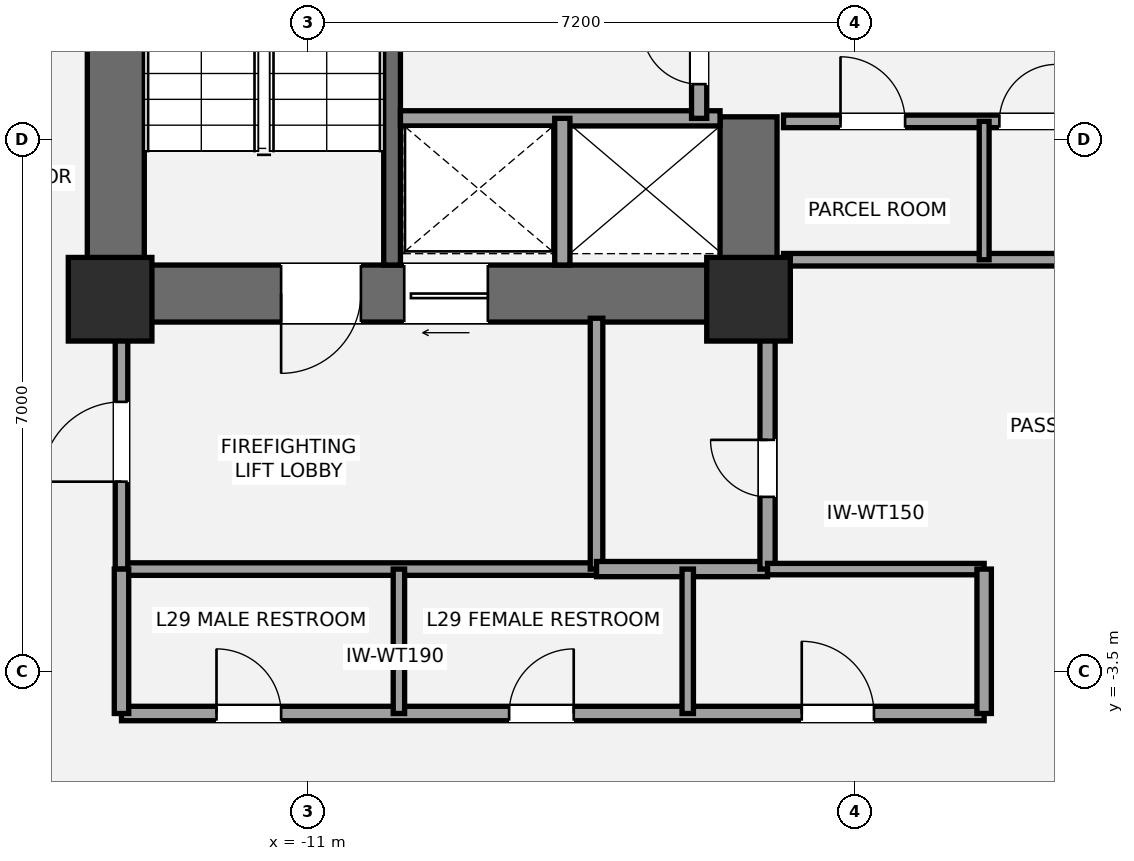
"""IFC4 building model, lengths in metres.
Left out: names, types, materials, properties, quantities, classifications, styles, units other than length and angle.
Written with IfcOpenShell. Run it as: python <this file> out.ifc"""

import sys

from ifc_helpers import new_model, si_unit, direction, frame, frame_2d, origin, origin_2d, place, context, subcontext, project, spatial, rectangle, extrude, element, fill, save


model = new_model("IFC4")
c1 = context("Model", 3, precision=1e-05, world=origin(), true_north=direction((0.0, 1.0)))
c2 = subcontext(c1, "Body", "Model", "MODEL_VIEW")
j1 = project(units=[si_unit("LENGTHUNIT", "METRE"), si_unit("PLANEANGLEUNIT", "RADIAN")], contexts=[c1])
p1 = place(None, origin())
s1 = spatial("IfcSite", under=j1, at=p1, CompositionType="ELEMENT")
p2 = place(p1, origin())
s2 = spatial("IfcBuilding", under=s1, at=p2, CompositionType="ELEMENT")
p3 = place(p2, frame((0.0, 0.0, 110.6)))
s3 = spatial("IfcBuildingStorey", under=s2, at=p3, CompositionType="ELEMENT", Elevation=110.6)
p4 = place(p3, frame((-13.525, 1.1, 0.0), z_axis=(0.0, 0.0, 1.0), x_axis=(0.0, 1.0, 0.0)))
e1 = element("IfcWall", 1, at=p4, inside=s3, PredefinedType="SHEAR", context=c2, shape_type="SweptSolid", body=[
    extrude(rectangle(XDim=8.65, YDim=0.75, at=frame_2d((4.325, 0.0))), origin(), (0.0, 0.0, 1.0), 3.5),
])
p5 = place(p3, frame((-4.825, 1.475, 0.0), z_axis=(0.0, 0.0, 1.0), x_axis=(-1.0, 0.0, 0.0)))
e2 = element("IfcWall", 2, at=p5, inside=s3, PredefinedType="SHEAR", context=c2, shape_type="SweptSolid", body=[
    extrude(rectangle(XDim=9.075, YDim=0.75, at=frame_2d((4.538, 0.0))), origin(), (0.0, 0.0, 1.0), 3.5),
])
p6 = place(p5, frame((5.475, 0.0, 0.0)))
e3 = element("IfcOpeningElement", 3, at=p6, cuts=e2, PredefinedType="OPENING", context=c2, shape_type="SweptSolid", body=[
    extrude(rectangle(XDim=1.05, YDim=2.15, at=frame_2d((0.525, 1.075))), frame((0.0, 0.385, 0.0), z_axis=(0.0, -1.0, 0.0), x_axis=(1.0, 0.0, 0.0)), (0.0, 0.0, 1.0), 0.77),
])
p7 = place(p5, frame((3.805, 0.0, 0.0)))
e4 = element("IfcOpeningElement", 4, at=p7, cuts=e2, PredefinedType="OPENING", context=c2, shape_type="SweptSolid", body=[
    extrude(rectangle(XDim=1.1, YDim=2.2, at=frame_2d((0.55, 1.1))), frame((0.0, 0.385, 0.0), z_axis=(0.0, -1.0, 0.0), x_axis=(1.0, 0.0, 0.0)), (0.0, 0.0, 1.0), 0.77),
])
p8 = place(p3, frame((-5.2, 1.1, 0.0), z_axis=(0.0, 0.0, 1.0), x_axis=(0.0, 1.0, 0.0)))
e5 = element("IfcWall", 5, at=p8, inside=s3, PredefinedType="SHEAR", context=c2, shape_type="SweptSolid", body=[
    extrude(rectangle(XDim=2.7, YDim=0.75, at=frame_2d((1.35, 0.0))), origin(), (0.0, 0.0, 1.0), 3.5),
])
p9 = place(p3, frame((-9.89, 1.85, 0.0), z_axis=(0.0, 0.0, 1.0), x_axis=(0.0, 1.0, 0.0)))
e6 = element("IfcWall", 6, at=p9, inside=s3, PredefinedType="SHEAR", context=c2, shape_type="SweptSolid", body=[
    extrude(rectangle(XDim=7.15, YDim=0.22, at=frame_2d((3.575, 0.0))), origin(), (0.0, 0.0, 1.0), 3.5),
])
for number, where, z_axis, x_axis in (
    (7, (-13.6, 1.4, 0.0), (0.0, 0.0, 1.0), (1.0, 0.0, 0.0)),
    (8, (-5.2, 1.4, 0.0), (0.0, 0.0, 1.0), (1.0, 0.0, 0.0)),
):
    element("IfcColumn", number, at=place(p3, frame(where, z_axis=z_axis, x_axis=x_axis)), inside=s3, PredefinedType="COLUMN", context=c2, shape_type="SweptSolid", body=[
        extrude(rectangle(XDim=1.1, YDim=1.1, at=origin_2d()), origin(), (0.0, 0.0, 1.0), 3.5),
    ])
p10 = place(p3, frame((-13.45, -2.15, 0.0), z_axis=(0.0, 0.0, 1.0), x_axis=(1.0, 0.0, 0.0)))
e9 = element("IfcWall", 9, at=p10, inside=s3, PredefinedType="PARTITIONING", context=c2, shape_type="SweptSolid", body=[
    extrude(rectangle(XDim=6.25, YDim=0.165, at=frame_2d((3.125, 0.0))), origin(), (0.0, 0.0, 1.0), 3.31),
])
p11 = place(p3, frame((-13.45, -2.15, 0.0), z_axis=(0.0, 0.0, 1.0), x_axis=(0.0, 1.0, 0.0)))
e10 = element("IfcWall", 10, at=p11, inside=s3, PredefinedType="PARTITIONING", context=c2, shape_type="SweptSolid", body=[
    extrude(rectangle(XDim=3.3, YDim=0.165, at=frame_2d((1.65, 0.0))), origin(), (0.0, 0.0, 1.0), 2.763),
])
p12 = place(p11, frame((1.15, 0.0, 0.0)))
e11 = element("IfcOpeningElement", 11, at=p12, cuts=e10, PredefinedType="OPENING", context=c2, shape_type="SweptSolid", body=[
    extrude(rectangle(XDim=1.05, YDim=2.15, at=frame_2d((0.525, 1.075))), frame((0.0, 0.093, 0.0), z_axis=(0.0, -1.0, 0.0), x_axis=(1.0, 0.0, 0.0)), (0.0, 0.0, 1.0), 0.185),
])
p13 = place(p3, frame((-7.2, -2.15, 0.0), z_axis=(0.0, 0.0, 1.0), x_axis=(0.0, 1.0, 0.0)))
e12 = element("IfcWall", 12, at=p13, inside=s3, PredefinedType="PARTITIONING", context=c2, shape_type="SweptSolid", body=[
    extrude(rectangle(XDim=3.3, YDim=0.165, at=frame_2d((1.65, 0.0))), origin(), (0.0, 0.0, 1.0), 2.763),
])
p14 = place(p3, frame((-7.2, -2.15, 0.0), z_axis=(0.0, 0.0, 1.0), x_axis=(1.0, 0.0, 0.0)))
e13 = element("IfcWall", 13, at=p14, inside=s3, PredefinedType="SOLIDWALL", context=c2, shape_type="SweptSolid", body=[
    extrude(rectangle(XDim=2.25, YDim=0.2, at=frame_2d((1.125, 0.0))), origin(), (0.0, 0.0, 1.0), 2.763),
])
p15 = place(p3, frame((-4.95, -2.15, 0.0), z_axis=(0.0, 0.0, 1.0), x_axis=(0.0, 1.0, 0.0)))
e14 = element("IfcWall", 14, at=p15, inside=s3, PredefinedType="SOLIDWALL", context=c2, shape_type="SweptSolid", body=[
    extrude(rectangle(XDim=3.3, YDim=0.2, at=frame_2d((1.65, 0.0))), origin(), (0.0, 0.0, 1.0), 2.763),
])
p16 = place(p15, frame((0.95, 0.0, 0.0)))
e15 = element("IfcOpeningElement", 15, at=p16, cuts=e14, PredefinedType="OPENING", context=c2, shape_type="SweptSolid", body=[
    extrude(rectangle(XDim=0.75, YDim=2.1, at=frame_2d((0.375, 1.05))), frame((0.0, 0.11, 0.0), z_axis=(0.0, -1.0, 0.0), x_axis=(1.0, 0.0, 0.0)), (0.0, 0.0, 1.0), 0.22),
])
p17 = place(p3, frame((-9.78, 3.78, 0.0), z_axis=(0.0, 0.0, 1.0), x_axis=(1.0, 0.0, 0.0)))
e16 = element("IfcWall", 16, at=p17, inside=s3, PredefinedType="SOLIDWALL", context=c2, shape_type="SweptSolid", body=[
    extrude(rectangle(XDim=4.205, YDim=0.2, at=frame_2d((2.103, 0.0))), origin(), (0.0, 0.0, 1.0), 3.31),
])
p18 = place(p3, frame((-7.65, 1.85, 0.0), z_axis=(0.0, 0.0, 1.0), x_axis=(0.0, 1.0, 0.0)))
e17 = element("IfcWall", 17, at=p18, inside=s3, PredefinedType="SOLIDWALL", context=c2, shape_type="SweptSolid", body=[
    extrude(rectangle(XDim=1.93, YDim=0.2, at=frame_2d((0.965, 0.0))), origin(), (0.0, 0.0, 1.0), 3.31),
])
p19 = place(p3, frame((-5.85, 3.78, 0.0), z_axis=(0.0, 0.0, 1.0), x_axis=(0.0, 1.0, 0.0)))
e18 = element("IfcWall", 18, at=p19, inside=s3, PredefinedType="SOLIDWALL", context=c2, shape_type="SweptSolid", body=[
    extrude(rectangle(XDim=1.69, YDim=0.2, at=frame_2d((0.845, 0.0))), origin(), (0.0, 0.0, 1.0), 3.31),
])
p20 = place(p19, frame((0.45, 0.0, 0.0)))
e19 = element("IfcOpeningElement", 19, at=p20, cuts=e18, PredefinedType="OPENING", context=c2, shape_type="SweptSolid", body=[
    extrude(rectangle(XDim=0.75, YDim=2.1, at=frame_2d((0.375, 1.05))), frame((0.0, 0.11, 0.0), z_axis=(0.0, -1.0, 0.0), x_axis=(1.0, 0.0, 0.0)), (0.0, 0.0, 1.0), 0.22),
])
p21 = place(p3, frame((-4.74, 1.92, 0.0), z_axis=(0.0, 0.0, 1.0), x_axis=(1.0, 0.0, 0.0)))
e20 = element("IfcWall", 20, at=p21, inside=s3, PredefinedType="PARTITIONING", context=c2, shape_type="SweptSolid", body=[
    extrude(rectangle(XDim=3.89, YDim=0.165, at=frame_2d((1.945, 0.0))), origin(), (0.0, 0.0, 1.0), 2.3),
])
p22 = place(p3, frame((-4.74, 3.74, 0.0), z_axis=(0.0, 0.0, 1.0), x_axis=(1.0, 0.0, 0.0)))
e21 = element("IfcWall", 21, at=p22, inside=s3, PredefinedType="PARTITIONING", context=c2, shape_type="SweptSolid", body=[
    extrude(rectangle(XDim=3.89, YDim=0.165, at=frame_2d((1.945, 0.0))), origin(), (0.0, 0.0, 1.0), 3.31),
])
p23 = place(p22, frame((0.75, 0.0, 0.0)))
e22 = element("IfcOpeningElement", 22, at=p23, cuts=e21, PredefinedType="OPENING", context=c2, shape_type="SweptSolid", body=[
    extrude(rectangle(XDim=0.85, YDim=2.1, at=frame_2d((0.425, 1.05))), frame((0.0, 0.093, 0.0), z_axis=(0.0, -1.0, 0.0), x_axis=(1.0, 0.0, 0.0)), (0.0, 0.0, 1.0), 0.185),
])
p24 = place(p22, frame((2.84, 0.0, 0.0)))
e23 = element("IfcOpeningElement", 23, at=p24, cuts=e21, PredefinedType="OPENING", context=c2, shape_type="SweptSolid", body=[
    extrude(rectangle(XDim=0.75, YDim=2.1, at=frame_2d((0.375, 1.05))), frame((0.0, 0.093, 0.0), z_axis=(0.0, -1.0, 0.0), x_axis=(1.0, 0.0, 0.0)), (0.0, 0.0, 1.0), 0.185),
])
p25 = place(p3, frame((-2.1, 1.92, 0.0), z_axis=(0.0, 0.0, 1.0), x_axis=(0.0, 1.0, 0.0)))
e24 = element("IfcWall", 24, at=p25, inside=s3, PredefinedType="PARTITIONING", context=c2, shape_type="SweptSolid", body=[
    extrude(rectangle(XDim=1.82, YDim=0.13, at=frame_2d((0.91, 0.0))), origin(), (0.0, 0.0, 1.0), 3.31),
])
p26 = place(p3, frame((-13.45, -4.05, 0.0), z_axis=(0.0, 0.0, 1.0), x_axis=(1.0, 0.0, 0.0)))
e25 = element("IfcWall", 25, at=p26, inside=s3, PredefinedType="PLUMBINGWALL", context=c2, shape_type="SweptSolid", body=[
    extrude(rectangle(XDim=11.35, YDim=0.19, at=frame_2d((5.675, 0.0))), origin(), (0.0, 0.0, 1.0), 2.763),
])
p27 = place(p26, frame((1.25, 0.0, 0.0)))
e26 = element("IfcOpeningElement", 26, at=p27, cuts=e25, PredefinedType="OPENING", context=c2, shape_type="SweptSolid", body=[
    extrude(rectangle(XDim=0.85, YDim=2.1, at=frame_2d((0.425, 1.05))), frame((0.0, 0.105, 0.0), z_axis=(0.0, -1.0, 0.0), x_axis=(1.0, 0.0, 0.0)), (0.0, 0.0, 1.0), 0.21),
])
p28 = place(p26, frame((5.1, 0.0, 0.0)))
e27 = element("IfcOpeningElement", 27, at=p28, cuts=e25, PredefinedType="OPENING", context=c2, shape_type="SweptSolid", body=[
    extrude(rectangle(XDim=0.85, YDim=2.1, at=frame_2d((0.425, 1.05))), frame((0.0, 0.105, 0.0), z_axis=(0.0, -1.0, 0.0), x_axis=(1.0, 0.0, 0.0)), (0.0, 0.0, 1.0), 0.21),
])
p29 = place(p26, frame((8.95, 0.0, 0.0)))
e28 = element("IfcOpeningElement", 28, at=p29, cuts=e25, PredefinedType="OPENING", context=c2, shape_type="SweptSolid", body=[
    extrude(rectangle(XDim=0.95, YDim=2.15, at=frame_2d((0.475, 1.075))), frame((0.0, 0.105, 0.0), z_axis=(0.0, -1.0, 0.0), x_axis=(1.0, 0.0, 0.0)), (0.0, 0.0, 1.0), 0.21),
])
p30 = place(p3, frame((-4.95, -2.15, 0.0), z_axis=(0.0, 0.0, 1.0), x_axis=(1.0, 0.0, 0.0)))
e29 = element("IfcWall", 29, at=p30, inside=s3, PredefinedType="PLUMBINGWALL", context=c2, shape_type="SweptSolid", body=[
    extrude(rectangle(XDim=2.85, YDim=0.15, at=frame_2d((1.425, 0.0))), origin(), (0.0, 0.0, 1.0), 3.31),
])
p31 = place(p3, frame((-13.45, -4.05, 0.0), z_axis=(0.0, 0.0, 1.0), x_axis=(0.0, 1.0, 0.0)))
e30 = element("IfcWall", 30, at=p31, inside=s3, PredefinedType="PLUMBINGWALL", context=c2, shape_type="SweptSolid", body=[
    extrude(rectangle(XDim=1.9, YDim=0.19, at=frame_2d((0.95, 0.0))), origin(), (0.0, 0.0, 1.0), 2.763),
])
p32 = place(p3, frame((-2.1, -4.05, 0.0), z_axis=(0.0, 0.0, 1.0), x_axis=(0.0, 1.0, 0.0)))
e31 = element("IfcWall", 31, at=p32, inside=s3, PredefinedType="PLUMBINGWALL", context=c2, shape_type="SweptSolid", body=[
    extrude(rectangle(XDim=1.9, YDim=0.19, at=frame_2d((0.95, 0.0))), origin(), (0.0, 0.0, 1.0), 3.31),
])
p33 = place(p3, frame((-9.8, -4.05, 0.0), z_axis=(0.0, 0.0, 1.0), x_axis=(0.0, 1.0, 0.0)))
e32 = element("IfcWall", 32, at=p33, inside=s3, PredefinedType="PLUMBINGWALL", context=c2, shape_type="SweptSolid", body=[
    extrude(rectangle(XDim=1.9, YDim=0.15, at=frame_2d((0.95, 0.0))), origin(), (0.0, 0.0, 1.0), 3.31),
])
p34 = place(p3, frame((-6.0, -4.05, 0.0), z_axis=(0.0, 0.0, 1.0), x_axis=(0.0, 1.0, 0.0)))
e33 = element("IfcWall", 33, at=p34, inside=s3, PredefinedType="PLUMBINGWALL", context=c2, shape_type="SweptSolid", body=[
    extrude(rectangle(XDim=1.9, YDim=0.15, at=frame_2d((0.95, 0.0))), origin(), (0.0, 0.0, 1.0), 2.763),
])
p35 = place(p6, origin())
e34 = element("IfcDoor", 34, at=p35, inside=s3, OperationType="SINGLE_SWING_RIGHT", PredefinedType="DOOR", context=c2, shape_type="SweptSolid", body=[
    extrude(rectangle(XDim=1.05, YDim=2.15, at=frame_2d((0.525, 1.075))), frame((0.0, 0.025, 0.0), z_axis=(0.0, -1.0, 0.0), x_axis=(1.0, 0.0, 0.0)), (0.0, 0.0, 1.0), 0.05),
])
fill(e3, e34)
p36 = place(p12, origin())
e35 = element("IfcDoor", 35, at=p36, inside=s3, OperationType="SINGLE_SWING_LEFT", PredefinedType="DOOR", context=c2, shape_type="SweptSolid", body=[
    extrude(rectangle(XDim=1.05, YDim=2.15, at=frame_2d((0.525, 1.075))), frame((0.0, 0.025, 0.0), z_axis=(0.0, -1.0, 0.0), x_axis=(1.0, 0.0, 0.0)), (0.0, 0.0, 1.0), 0.05),
])
fill(e11, e35)
p37 = place(p16, origin())
e36 = element("IfcDoor", 36, at=p37, inside=s3, OperationType="SINGLE_SWING_RIGHT", PredefinedType="DOOR", context=c2, shape_type="SweptSolid", body=[
    extrude(rectangle(XDim=0.75, YDim=2.1, at=frame_2d((0.375, 1.05))), frame((0.0, 0.025, 0.0), z_axis=(0.0, -1.0, 0.0), x_axis=(1.0, 0.0, 0.0)), (0.0, 0.0, 1.0), 0.05),
])
fill(e15, e36)
p38 = place(p7, origin())
e37 = element("IfcDoor", 37, at=p38, inside=s3, OperationType="SLIDING_TO_LEFT", PredefinedType="DOOR", context=c2, shape_type="SweptSolid", body=[
    extrude(rectangle(XDim=1.1, YDim=2.2, at=frame_2d((0.55, 1.1))), frame((0.0, 0.025, 0.0), z_axis=(0.0, -1.0, 0.0), x_axis=(1.0, 0.0, 0.0)), (0.0, 0.0, 1.0), 0.05),
])
fill(e4, e37)
p39 = place(p20, origin())
e38 = element("IfcDoor", 38, at=p39, inside=s3, OperationType="SINGLE_SWING_RIGHT", PredefinedType="DOOR", context=c2, shape_type="SweptSolid", body=[
    extrude(rectangle(XDim=0.75, YDim=2.1, at=frame_2d((0.375, 1.05))), frame((0.0, 0.025, 0.0), z_axis=(0.0, -1.0, 0.0), x_axis=(1.0, 0.0, 0.0)), (0.0, 0.0, 1.0), 0.05),
])
fill(e19, e38)
p40 = place(p23, origin())
e39 = element("IfcDoor", 39, at=p40, inside=s3, OperationType="SINGLE_SWING_LEFT", PredefinedType="DOOR", context=c2, shape_type="SweptSolid", body=[
    extrude(rectangle(XDim=0.85, YDim=2.1, at=frame_2d((0.425, 1.05))), frame((0.0, 0.025, 0.0), z_axis=(0.0, -1.0, 0.0), x_axis=(1.0, 0.0, 0.0)), (0.0, 0.0, 1.0), 0.05),
])
fill(e22, e39)
p41 = place(p24, origin())
e40 = element("IfcDoor", 40, at=p41, inside=s3, OperationType="SINGLE_SWING_RIGHT", PredefinedType="DOOR", context=c2, shape_type="SweptSolid", body=[
    extrude(rectangle(XDim=0.75, YDim=2.1, at=frame_2d((0.375, 1.05))), frame((0.0, 0.025, 0.0), z_axis=(0.0, -1.0, 0.0), x_axis=(1.0, 0.0, 0.0)), (0.0, 0.0, 1.0), 0.05),
])
fill(e23, e40)
p42 = place(p27, origin())
e41 = element("IfcDoor", 41, at=p42, inside=s3, OperationType="SINGLE_SWING_LEFT", PredefinedType="DOOR", context=c2, shape_type="SweptSolid", body=[
    extrude(rectangle(XDim=0.85, YDim=2.1, at=frame_2d((0.425, 1.05))), frame((0.0, 0.025, 0.0), z_axis=(0.0, -1.0, 0.0), x_axis=(1.0, 0.0, 0.0)), (0.0, 0.0, 1.0), 0.05),
])
fill(e26, e41)
p43 = place(p28, origin())
e42 = element("IfcDoor", 42, at=p43, inside=s3, OperationType="SINGLE_SWING_RIGHT", PredefinedType="DOOR", context=c2, shape_type="SweptSolid", body=[
    extrude(rectangle(XDim=0.85, YDim=2.1, at=frame_2d((0.425, 1.05))), frame((0.0, 0.025, 0.0), z_axis=(0.0, -1.0, 0.0), x_axis=(1.0, 0.0, 0.0)), (0.0, 0.0, 1.0), 0.05),
])
fill(e27, e42)
p44 = place(p29, origin())
e43 = element("IfcDoor", 43, at=p44, inside=s3, OperationType="SINGLE_SWING_LEFT", PredefinedType="DOOR", context=c2, shape_type="SweptSolid", body=[
    extrude(rectangle(XDim=0.95, YDim=2.15, at=frame_2d((0.475, 1.075))), frame((0.0, 0.025, 0.0), z_axis=(0.0, -1.0, 0.0), x_axis=(1.0, 0.0, 0.0)), (0.0, 0.0, 1.0), 0.05),
])
fill(e28, e43)
save(model, sys.argv[1])
